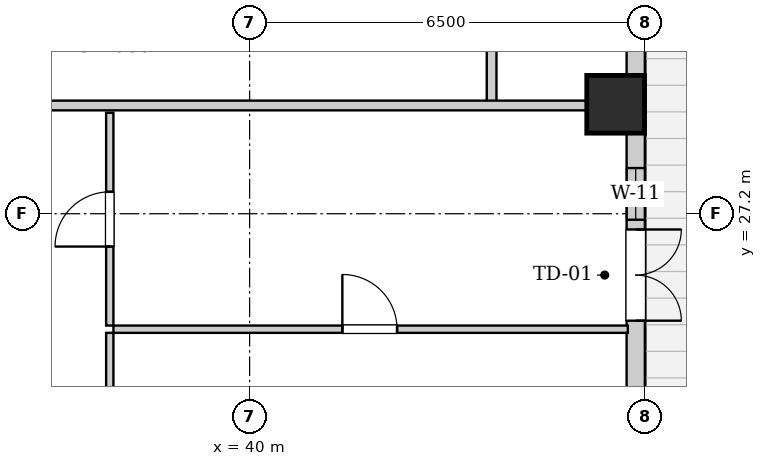
"""IFC4 building model, lengths in metres.
Left out: names, types, materials, properties, quantities, classifications, styles, units other than length and angle.
Written with IfcOpenShell. Run it as: python <this file> out.ifc"""

import sys

from ifc_helpers import new_model, si_unit, direction, frame, frame_2d, origin, origin_2d, place, context, subcontext, project, spatial, rectangle, extrude, element, fill, save


model = new_model("IFC4")
c1 = context("Model", 3, precision=1e-05, world=origin(), true_north=direction((0.0, 1.0)))
c2 = subcontext(c1, "Body", "Model", "MODEL_VIEW")
j1 = project(units=[si_unit("LENGTHUNIT", "METRE"), si_unit("PLANEANGLEUNIT", "RADIAN")], contexts=[c1])
p1 = place(None, origin())
s1 = spatial("IfcSite", under=j1, at=p1, CompositionType="ELEMENT")
p2 = place(p1, origin())
s2 = spatial("IfcBuilding", under=s1, at=p2, CompositionType="ELEMENT")
p3 = place(p2, frame((0.0, 0.0, 25.8)))
s3 = spatial("IfcBuildingStorey", under=s2, at=p3, CompositionType="ELEMENT", Elevation=25.8)
p4 = place(p3, frame((46.02, 29.0, 0.0), z_axis=(0.0, 0.0, 1.0), x_axis=(1.0, 0.0, 0.0)))
e1 = element("IfcColumn", 1, at=p4, inside=s3, PredefinedType="COLUMN", context=c2, shape_type="SweptSolid", body=[
    extrude(rectangle(XDim=0.95, YDim=0.95, at=origin_2d()), origin(), (0.0, 0.0, 1.0), 3.2),
])
p5 = place(p3, frame((46.35, 45.1, 0.0), z_axis=(0.0, 0.0, 1.0), x_axis=(0.0, -1.0, 0.0)))
e2 = element("IfcWall", 2, at=p5, inside=s3, PredefinedType="SOLIDWALL", context=c2, shape_type="SweptSolid", body=[
    extrude(rectangle(XDim=42.6, YDim=0.3, at=frame_2d((21.3, 0.0))), origin(), (0.0, 0.0, 1.0), 1.988),
])
p6 = place(p5, frame((18.159, 0.0, 0.0)))
e3 = element("IfcOpeningElement", 3, at=p6, cuts=e2, PredefinedType="OPENING", context=c2, shape_type="SweptSolid", body=[
    extrude(rectangle(XDim=1.5, YDim=1.982, at=frame_2d((0.75, 0.991))), frame((0.0, 0.16, 0.0), z_axis=(0.0, -1.0, 0.0), x_axis=(1.0, 0.0, 0.0)), (0.0, 0.0, 1.0), 0.32),
])
p7 = place(p5, frame((37.575, 0.0, 0.55)))
e4 = element("IfcOpeningElement", 4, at=p7, cuts=e2, PredefinedType="OPENING", context=c2, shape_type="SweptSolid", body=[
    extrude(rectangle(XDim=1.8, YDim=1.2, at=frame_2d((0.9, 0.6))), frame((0.0, 0.16, 0.0), z_axis=(0.0, -1.0, 0.0), x_axis=(1.0, 0.0, 0.0)), (0.0, 0.0, 1.0), 0.32),
])
p8 = place(p5, frame((34.85, 0.0, 0.55)))
e5 = element("IfcOpeningElement", 5, at=p8, cuts=e2, PredefinedType="OPENING", context=c2, shape_type="SweptSolid", body=[
    extrude(rectangle(XDim=1.35, YDim=1.2, at=frame_2d((0.675, 0.6))), frame((0.0, 0.16, 0.0), z_axis=(0.0, -1.0, 0.0), x_axis=(1.0, 0.0, 0.0)), (0.0, 0.0, 1.0), 0.32),
])
p9 = place(p5, frame((3.665, 0.0, 0.55)))
e6 = element("IfcOpeningElement", 6, at=p9, cuts=e2, PredefinedType="OPENING", context=c2, shape_type="SweptSolid", body=[
    extrude(rectangle(XDim=1.8, YDim=1.2, at=frame_2d((0.9, 0.6))), frame((0.0, 0.16, 0.0), z_axis=(0.0, -1.0, 0.0), x_axis=(1.0, 0.0, 0.0)), (0.0, 0.0, 1.0), 0.32),
])
p10 = place(p5, frame((1.185, 0.0, 0.55)))
e7 = element("IfcOpeningElement", 7, at=p10, cuts=e2, PredefinedType="OPENING", context=c2, shape_type="SweptSolid", body=[
    extrude(rectangle(XDim=1.35, YDim=1.2, at=frame_2d((0.675, 0.6))), frame((0.0, 0.16, 0.0), z_axis=(0.0, -1.0, 0.0), x_axis=(1.0, 0.0, 0.0)), (0.0, 0.0, 1.0), 0.32),
])
p11 = place(p5, frame((27.225, 0.0, 0.55)))
e8 = element("IfcOpeningElement", 8, at=p11, cuts=e2, PredefinedType="OPENING", context=c2, shape_type="SweptSolid", body=[
    extrude(rectangle(XDim=1.8, YDim=1.2, at=frame_2d((0.9, 0.6))), frame((0.0, 0.16, 0.0), z_axis=(0.0, -1.0, 0.0), x_axis=(1.0, 0.0, 0.0)), (0.0, 0.0, 1.0), 0.32),
])
p12 = place(p5, frame((17.149, 0.0, 0.55)))
e9 = element("IfcOpeningElement", 9, at=p12, cuts=e2, PredefinedType="OPENING", context=c2, shape_type="SweptSolid", body=[
    extrude(rectangle(XDim=0.85, YDim=1.2, at=frame_2d((0.425, 0.6))), frame((0.0, 0.16, 0.0), z_axis=(0.0, -1.0, 0.0), x_axis=(1.0, 0.0, 0.0)), (0.0, 0.0, 1.0), 0.32),
])
p13 = place(p3, frame((43.98, 28.98, 0.0), z_axis=(0.0, 0.0, 1.0), x_axis=(0.0, 1.0, 0.0)))
e10 = element("IfcWall", 10, at=p13, inside=s3, PredefinedType="PARTITIONING", context=c2, shape_type="SweptSolid", body=[
    extrude(rectangle(XDim=1.74, YDim=0.16, at=frame_2d((0.87, 0.0))), origin(), (0.0, 0.0, 1.0), 2.94),
])
p14 = place(p3, frame((35.11, 28.98, 0.0), z_axis=(0.0, 0.0, 1.0), x_axis=(1.0, 0.0, 0.0)))
e11 = element("IfcWall", 11, at=p14, inside=s3, PredefinedType="PARTITIONING", context=c2, shape_type="SweptSolid", body=[
    extrude(rectangle(XDim=11.11, YDim=0.16, at=frame_2d((5.555, 0.0))), origin(), (0.0, 0.0, 1.0), 2.155),
])
p15 = place(p3, frame((37.7, 22.35, 0.0), z_axis=(0.0, 0.0, 1.0), x_axis=(0.0, 1.0, 0.0)))
e12 = element("IfcWall", 12, at=p15, inside=s3, PredefinedType="PARTITIONING", context=c2, shape_type="SweptSolid", body=[
    extrude(rectangle(XDim=2.891, YDim=0.12, at=frame_2d((1.445, 0.0))), origin(), (0.0, 0.0, 1.0), 2.94),
])
p16 = place(p15, frame((0.995, 0.0, 0.0)))
e13 = element("IfcOpeningElement", 13, at=p16, cuts=e12, PredefinedType="OPENING", context=c2, shape_type="SweptSolid", body=[
    extrude(rectangle(XDim=0.9, YDim=2.05, at=frame_2d((0.45, 1.025))), frame((0.0, 0.07, 0.0), z_axis=(0.0, -1.0, 0.0), x_axis=(1.0, 0.0, 0.0)), (0.0, 0.0, 1.0), 0.14),
])
p17 = place(p3, frame((37.7, 25.361, 0.0), z_axis=(0.0, 0.0, 1.0), x_axis=(0.0, 1.0, 0.0)))
e14 = element("IfcWall", 14, at=p17, inside=s3, PredefinedType="PARTITIONING", context=c2, shape_type="SweptSolid", body=[
    extrude(rectangle(XDim=3.499, YDim=0.12, at=frame_2d((1.75, 0.0))), origin(), (0.0, 0.0, 1.0), 2.94),
])
p18 = place(p17, frame((1.299, 0.0, 0.0)))
e15 = element("IfcOpeningElement", 15, at=p18, cuts=e14, PredefinedType="OPENING", context=c2, shape_type="SweptSolid", body=[
    extrude(rectangle(XDim=0.9, YDim=2.05, at=frame_2d((0.45, 1.025))), frame((0.0, 0.07, 0.0), z_axis=(0.0, -1.0, 0.0), x_axis=(1.0, 0.0, 0.0)), (0.0, 0.0, 1.0), 0.14),
])
p19 = place(p3, frame((37.76, 25.301, 0.0), z_axis=(0.0, 0.0, 1.0), x_axis=(1.0, 0.0, 0.0)))
e16 = element("IfcWall", 16, at=p19, inside=s3, PredefinedType="PARTITIONING", context=c2, shape_type="SweptSolid", body=[
    extrude(rectangle(XDim=8.46, YDim=0.12, at=frame_2d((4.23, 0.0))), origin(), (0.0, 0.0, 1.0), 2.94),
])
p20 = place(p19, frame((3.765, 0.0, 0.0)))
e17 = element("IfcOpeningElement", 17, at=p20, cuts=e16, PredefinedType="OPENING", context=c2, shape_type="SweptSolid", body=[
    extrude(rectangle(XDim=0.9, YDim=2.05, at=frame_2d((0.45, 1.025))), frame((0.0, 0.07, 0.0), z_axis=(0.0, -1.0, 0.0), x_axis=(1.0, 0.0, 0.0)), (0.0, 0.0, 1.0), 0.14),
])
p21 = place(p18, origin())
e18 = element("IfcDoor", 18, at=p21, inside=s3, OperationType="SINGLE_SWING_LEFT", PredefinedType="DOOR", context=c2, shape_type="SweptSolid", body=[
    extrude(rectangle(XDim=0.9, YDim=2.05, at=frame_2d((0.45, 1.025))), frame((0.0, 0.025, 0.0), z_axis=(0.0, -1.0, 0.0), x_axis=(1.0, 0.0, 0.0)), (0.0, 0.0, 1.0), 0.05),
])
fill(e15, e18)
p22 = place(p20, origin())
e19 = element("IfcDoor", 19, at=p22, inside=s3, OperationType="SINGLE_SWING_LEFT", PredefinedType="DOOR", context=c2, shape_type="SweptSolid", body=[
    extrude(rectangle(XDim=0.9, YDim=2.05, at=frame_2d((0.45, 1.025))), frame((0.0, 0.025, 0.0), z_axis=(0.0, -1.0, 0.0), x_axis=(1.0, 0.0, 0.0)), (0.0, 0.0, 1.0), 0.05),
])
fill(e17, e19)
p23 = place(p6, origin())
e20 = element("IfcDoor", 20, at=p23, inside=s3, OperationType="DOUBLE_SWING_LEFT", PredefinedType="DOOR", context=c2, shape_type="SweptSolid", body=[
    extrude(rectangle(XDim=1.5, YDim=1.982, at=frame_2d((0.75, 0.991))), frame((0.0, 0.025, 0.0), z_axis=(0.0, -1.0, 0.0), x_axis=(1.0, 0.0, 0.0)), (0.0, 0.0, 1.0), 0.05),
])
fill(e3, e20)
p24 = place(p12, origin())
e21 = element("IfcWindow", 21, at=p24, inside=s3, PartitioningType="SINGLE_PANEL", PredefinedType="WINDOW", context=c2, shape_type="SweptSolid", body=[
    extrude(rectangle(XDim=0.85, YDim=1.2, at=frame_2d((0.425, 0.6))), frame((0.0, 0.03, 0.0), z_axis=(0.0, -1.0, 0.0), x_axis=(1.0, 0.0, 0.0)), (0.0, 0.0, 1.0), 0.06),
])
fill(e9, e21)
save(model, sys.argv[1])
